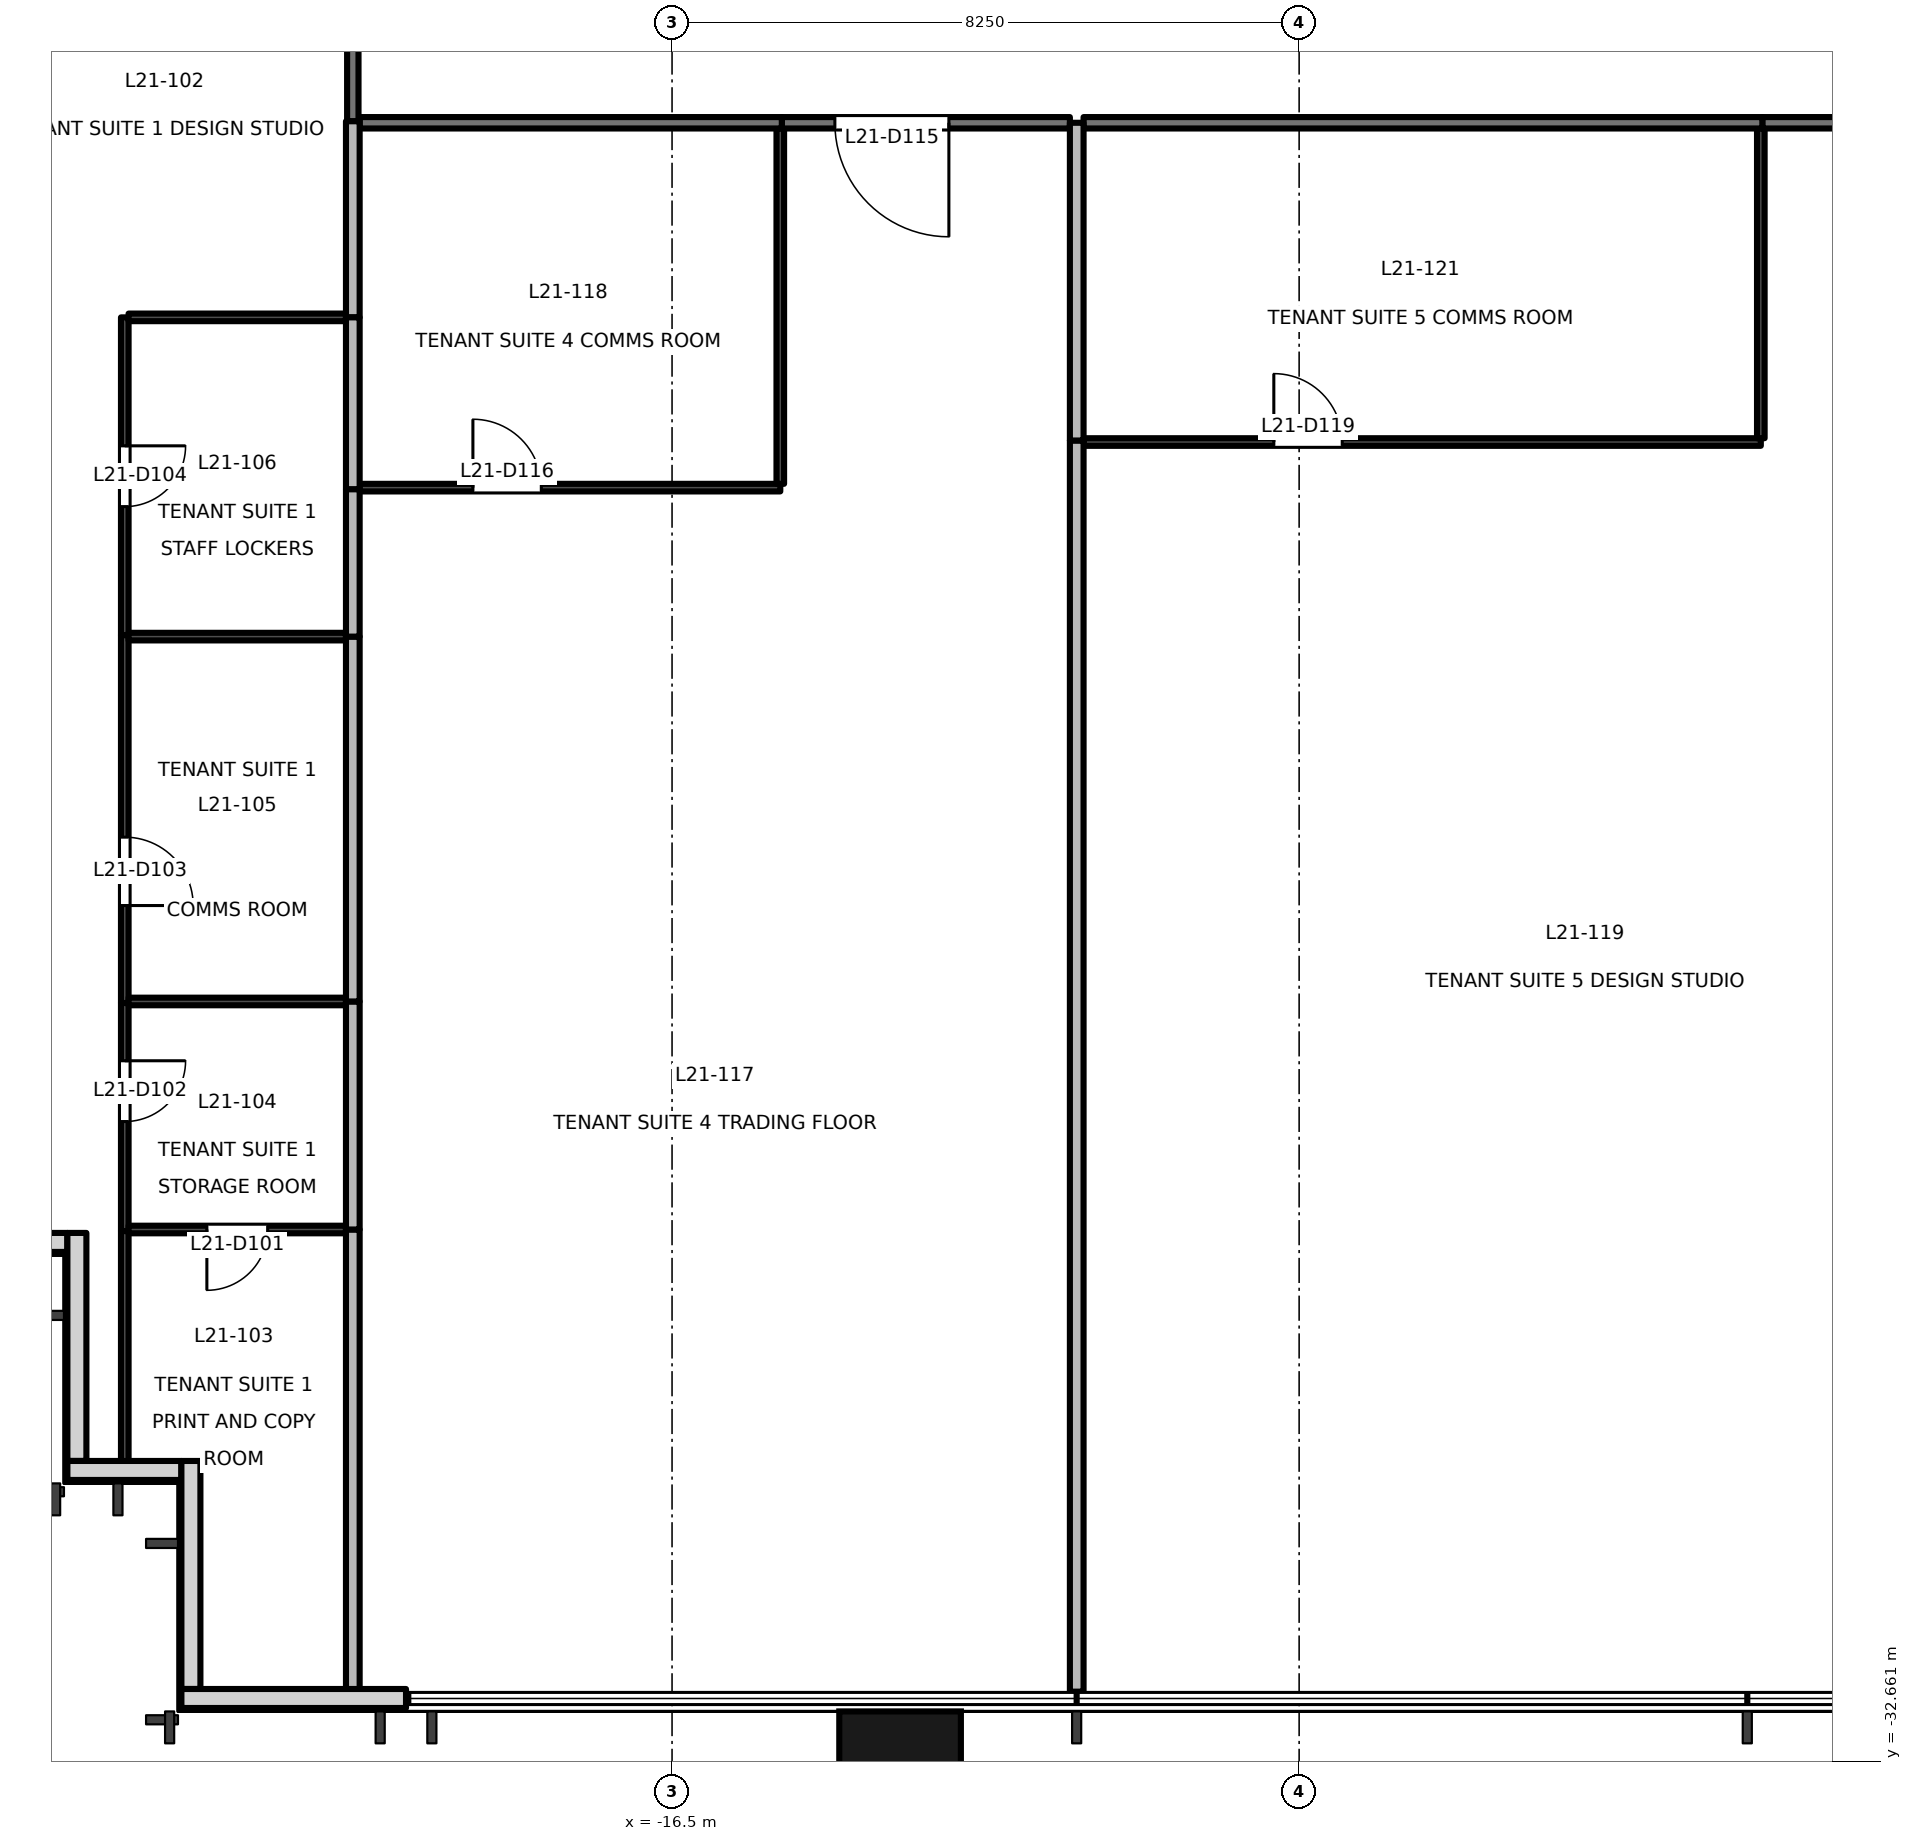
"""IFC4 building model, lengths in metres.
Left out: names, types, materials, properties, quantities, classifications, styles, units other than length and angle.
Written with IfcOpenShell. Run it as: python <this file> out.ifc"""

import sys

from ifc_helpers import new_model, si_unit, direction, frame, frame_2d, origin, origin_2d, place, context, subcontext, project, spatial, rectangle, extrude, element, fill, save


model = new_model("IFC4")
c1 = context("Model", 3, precision=1e-05, world=origin(), true_north=direction((0.0, 1.0)))
c2 = subcontext(c1, "Body", "Model", "MODEL_VIEW")
j1 = project(units=[si_unit("LENGTHUNIT", "METRE"), si_unit("PLANEANGLEUNIT", "RADIAN")], contexts=[c1])
p1 = place(None, origin())
s1 = spatial("IfcSite", under=j1, at=p1, CompositionType="ELEMENT")
p2 = place(p1, origin())
s2 = spatial("IfcBuilding", under=s1, at=p2, CompositionType="ELEMENT")
p3 = place(p2, frame((0.0, 0.0, 95.7)))
s3 = spatial("IfcBuildingStorey", under=s2, at=p3, CompositionType="ELEMENT", Elevation=95.7)
p4 = place(p3, frame((-13.5, -32.9, -0.2), z_axis=(0.0, 0.0, 1.0), x_axis=(1.0, 0.0, 0.0)))
e1 = element("IfcColumn", 1, at=p4, inside=s3, PredefinedType="COLUMN", context=c2, shape_type="SweptSolid", body=[
    extrude(rectangle(XDim=1.6, YDim=1.8, at=origin_2d()), origin(), (0.0, 0.0, 1.0), 4.0),
])
p5 = place(p3, frame((-25.91, -25.83, 0.0), z_axis=(0.0, 0.0, 1.0), x_axis=(1.0, 0.0, 0.0)))
e2 = element("IfcWall", 2, at=p5, inside=s3, PredefinedType="SOLIDWALL", context=c2, shape_type="SweptSolid", body=[
    extrude(rectangle(XDim=1.455, YDim=0.25, at=frame_2d((0.728, 0.0))), origin(), (0.0, 0.0, 1.0), 3.8),
])
p6 = place(p3, frame((-24.33, -25.705, 0.0), z_axis=(0.0, 0.0, 1.0), x_axis=(0.0, -1.0, 0.0)))
e3 = element("IfcWall", 3, at=p6, inside=s3, PredefinedType="SOLIDWALL", context=c2, shape_type="SweptSolid", body=[
    extrude(rectangle(XDim=3.0, YDim=0.25, at=frame_2d((1.5, 0.0))), origin(), (0.0, 0.0, 1.0), 3.8),
])
p7 = place(p3, frame((-24.455, -28.83, 0.0), z_axis=(0.0, 0.0, 1.0), x_axis=(1.0, 0.0, 0.0)))
e4 = element("IfcWall", 4, at=p7, inside=s3, PredefinedType="SOLIDWALL", context=c2, shape_type="SweptSolid", body=[
    extrude(rectangle(XDim=1.5, YDim=0.25, at=frame_2d((0.75, 0.0))), origin(), (0.0, 0.0, 1.0), 3.8),
])
p8 = place(p3, frame((-22.83, -28.705, 0.0), z_axis=(0.0, 0.0, 1.0), x_axis=(0.0, -1.0, 0.0)))
e5 = element("IfcWall", 5, at=p8, inside=s3, PredefinedType="SOLIDWALL", context=c2, shape_type="SweptSolid", body=[
    extrude(rectangle(XDim=3.0, YDim=0.25, at=frame_2d((1.5, 0.0))), origin(), (0.0, 0.0, 1.0), 3.8),
])
p9 = place(p3, frame((-22.955, -31.83, 0.0), z_axis=(0.0, 0.0, 1.0), x_axis=(1.0, 0.0, 0.0)))
e6 = element("IfcWall", 6, at=p9, inside=s3, PredefinedType="SOLIDWALL", context=c2, shape_type="SweptSolid", body=[
    extrude(rectangle(XDim=2.955, YDim=0.25, at=frame_2d((1.478, 0.0))), origin(), (0.0, 0.0, 1.0), 3.8),
])
p10 = place(p3, frame((-20.7, -11.08, 0.0), z_axis=(0.0, 0.0, 1.0), x_axis=(0.0, 1.0, 0.0)))
e7 = element("IfcWall", 7, at=p10, inside=s3, PredefinedType="PARTITIONING", context=c2, shape_type="SweptSolid", body=[
    extrude(rectangle(XDim=3.4, YDim=0.15, at=frame_2d((1.7, 0.0))), origin(), (0.0, 0.0, 1.0), 3.8),
])
p11 = place(p3, frame((-11.266, -11.1, 0.0), z_axis=(0.0, 0.0, 1.0), x_axis=(-1.0, 0.0, 0.0)))
e8 = element("IfcWall", 8, at=p11, inside=s3, PredefinedType="PARTITIONING", context=c2, shape_type="SweptSolid", body=[
    extrude(rectangle(XDim=3.79, YDim=0.15, at=frame_2d((1.895, 0.0))), origin(), (0.0, 0.0, 1.0), 2.8),
])
p12 = place(p11, frame((1.592, 0.0, 0.0)))
e9 = element("IfcOpeningElement", 9, at=p12, cuts=e8, PredefinedType="OPENING", context=c2, shape_type="SweptSolid", body=[
    extrude(rectangle(XDim=1.5, YDim=2.1, at=frame_2d((0.75, 1.05))), frame((0.0, 0.085, 0.0), z_axis=(0.0, -1.0, 0.0), x_axis=(1.0, 0.0, 0.0)), (0.0, 0.0, 1.0), 0.171),
])
p13 = place(p3, frame((-15.056, -11.1, 0.0), z_axis=(0.0, 0.0, 1.0), x_axis=(-1.0, 0.0, 0.0)))
e10 = element("IfcWall", 10, at=p13, inside=s3, PredefinedType="PARTITIONING", context=c2, shape_type="SweptSolid", body=[
    extrude(rectangle(XDim=5.554, YDim=0.15, at=frame_2d((2.777, 0.0))), origin(), (0.0, 0.0, 1.0), 3.8),
])
p14 = place(p3, frame((4.425, -11.1, 0.0), z_axis=(0.0, 0.0, 1.0), x_axis=(-1.0, 0.0, 0.0)))
e11 = element("IfcWall", 11, at=p14, inside=s3, PredefinedType="PARTITIONING", context=c2, shape_type="SweptSolid", body=[
    extrude(rectangle(XDim=6.581, YDim=0.15, at=frame_2d((3.291, 0.0))), origin(), (0.0, 0.0, 1.0), 2.8),
])
p15 = place(p3, frame((-2.156, -11.1, 0.0), z_axis=(0.0, 0.0, 1.0), x_axis=(-1.0, 0.0, 0.0)))
e12 = element("IfcWall", 12, at=p15, inside=s3, PredefinedType="PARTITIONING", context=c2, shape_type="SweptSolid", body=[
    extrude(rectangle(XDim=8.93, YDim=0.15, at=frame_2d((4.465, 0.0))), origin(), (0.0, 0.0, 1.0), 2.8),
])
p16 = place(p3, frame((-23.7, -25.68, 0.0), z_axis=(0.0, 0.0, 1.0), x_axis=(0.0, -1.0, 0.0)))
e13 = element("IfcWall", 13, at=p16, inside=s3, PredefinedType="PARTITIONING", context=c2, shape_type="SweptSolid", body=[
    extrude(rectangle(XDim=3.06, YDim=0.1, at=frame_2d((1.53, 0.0))), origin(), (0.0, 0.0, 1.0), 3.8),
])
p17 = place(p3, frame((-23.7, -22.68, 0.0), z_axis=(0.0, 0.0, 1.0), x_axis=(0.0, -1.0, 0.0)))
e14 = element("IfcWall", 14, at=p17, inside=s3, PredefinedType="PARTITIONING", context=c2, shape_type="SweptSolid", body=[
    extrude(rectangle(XDim=3.0, YDim=0.1, at=frame_2d((1.5, 0.0))), origin(), (0.0, 0.0, 1.0), 3.8),
])
p18 = place(p17, frame((0.76, 0.0, 0.0)))
e15 = element("IfcOpeningElement", 15, at=p18, cuts=e14, PredefinedType="OPENING", context=c2, shape_type="SweptSolid", body=[
    extrude(rectangle(XDim=0.8, YDim=2.1, at=frame_2d((0.4, 1.05))), frame((0.0, 0.061, 0.0), z_axis=(0.0, -1.0, 0.0), x_axis=(1.0, 0.0, 0.0)), (0.0, 0.0, 1.0), 0.121),
])
p19 = place(p3, frame((-23.7, -17.84, 0.0), z_axis=(0.0, 0.0, 1.0), x_axis=(0.0, -1.0, 0.0)))
e16 = element("IfcWall", 16, at=p19, inside=s3, PredefinedType="PARTITIONING", context=c2, shape_type="SweptSolid", body=[
    extrude(rectangle(XDim=4.84, YDim=0.1, at=frame_2d((2.42, 0.0))), origin(), (0.0, 0.0, 1.0), 3.8),
])
p20 = place(p19, frame((2.658, 0.0, 0.0)))
e17 = element("IfcOpeningElement", 17, at=p20, cuts=e16, PredefinedType="OPENING", context=c2, shape_type="SweptSolid", body=[
    extrude(rectangle(XDim=0.9, YDim=2.1, at=frame_2d((0.45, 1.05))), frame((0.0, 0.061, 0.0), z_axis=(0.0, -1.0, 0.0), x_axis=(1.0, 0.0, 0.0)), (0.0, 0.0, 1.0), 0.121),
])
p21 = place(p3, frame((-23.7, -13.66, 0.0), z_axis=(0.0, 0.0, 1.0), x_axis=(0.0, -1.0, 0.0)))
e18 = element("IfcWall", 18, at=p21, inside=s3, PredefinedType="PARTITIONING", context=c2, shape_type="SweptSolid", body=[
    extrude(rectangle(XDim=4.18, YDim=0.1, at=frame_2d((2.09, 0.0))), origin(), (0.0, 0.0, 1.0), 3.8),
])
p22 = place(p21, frame((1.69, 0.0, 0.0)))
e19 = element("IfcOpeningElement", 19, at=p22, cuts=e18, PredefinedType="OPENING", context=c2, shape_type="SweptSolid", body=[
    extrude(rectangle(XDim=0.8, YDim=2.1, at=frame_2d((0.4, 1.05))), frame((0.0, 0.061, 0.0), z_axis=(0.0, -1.0, 0.0), x_axis=(1.0, 0.0, 0.0)), (0.0, 0.0, 1.0), 0.121),
])
p23 = place(p3, frame((-20.79, -13.66, 0.0), z_axis=(0.0, 0.0, 1.0), x_axis=(-1.0, 0.0, 0.0)))
e20 = element("IfcWall", 20, at=p23, inside=s3, PredefinedType="PARTITIONING", context=c2, shape_type="SweptSolid", body=[
    extrude(rectangle(XDim=2.86, YDim=0.1, at=frame_2d((1.43, 0.0))), origin(), (0.0, 0.0, 1.0), 3.8),
])
p24 = place(p3, frame((-20.7, -11.08, 0.0), z_axis=(0.0, 0.0, 1.0), x_axis=(0.0, -1.0, 0.0)))
e21 = element("IfcWall", 21, at=p24, inside=s3, PredefinedType="PARTITIONING", context=c2, shape_type="SweptSolid", body=[
    extrude(rectangle(XDim=2.58, YDim=0.18, at=frame_2d((1.29, 0.0))), origin(), (0.0, 0.0, 1.0), 3.8),
])
p25 = place(p3, frame((-20.79, -25.66, 0.0), z_axis=(0.0, 0.0, 1.0), x_axis=(-1.0, 0.0, 0.0)))
e22 = element("IfcWall", 22, at=p25, inside=s3, PredefinedType="PARTITIONING", context=c2, shape_type="SweptSolid", body=[
    extrude(rectangle(XDim=2.86, YDim=0.1, at=frame_2d((1.43, 0.0))), origin(), (0.0, 0.0, 1.0), 3.8),
])
p26 = place(p25, frame((1.03, 0.0, 0.0)))
e23 = element("IfcOpeningElement", 23, at=p26, cuts=e22, PredefinedType="OPENING", context=c2, shape_type="SweptSolid", body=[
    extrude(rectangle(XDim=0.8, YDim=2.1, at=frame_2d((0.4, 1.05))), frame((0.0, 0.061, 0.0), z_axis=(0.0, -1.0, 0.0), x_axis=(1.0, 0.0, 0.0)), (0.0, 0.0, 1.0), 0.121),
])
p27 = place(p3, frame((-20.7, -25.66, 0.0), z_axis=(0.0, 0.0, 1.0), x_axis=(0.0, -1.0, 0.0)))
e24 = element("IfcWall", 24, at=p27, inside=s3, PredefinedType="PARTITIONING", context=c2, shape_type="SweptSolid", body=[
    extrude(rectangle(XDim=6.08, YDim=0.18, at=frame_2d((3.04, 0.0))), origin(), (0.0, 0.0, 1.0), 3.8),
])
p28 = place(p3, frame((-23.65, -22.66, 0.0), z_axis=(0.0, 0.0, 1.0), x_axis=(1.0, 0.0, 0.0)))
e25 = element("IfcWall", 25, at=p28, inside=s3, PredefinedType="PARTITIONING", context=c2, shape_type="SweptSolid", body=[
    extrude(rectangle(XDim=2.86, YDim=0.1, at=frame_2d((1.43, 0.0))), origin(), (0.0, 0.0, 1.0), 3.8),
])
p29 = place(p3, frame((-20.7, -22.66, 0.0), z_axis=(0.0, 0.0, 1.0), x_axis=(0.0, -1.0, 0.0)))
e26 = element("IfcWall", 26, at=p29, inside=s3, PredefinedType="PARTITIONING", context=c2, shape_type="SweptSolid", body=[
    extrude(rectangle(XDim=3.0, YDim=0.18, at=frame_2d((1.5, 0.0))), origin(), (0.0, 0.0, 1.0), 3.8),
])
p30 = place(p3, frame((-23.65, -17.86, 0.0), z_axis=(0.0, 0.0, 1.0), x_axis=(1.0, 0.0, 0.0)))
e27 = element("IfcWall", 27, at=p30, inside=s3, PredefinedType="PARTITIONING", context=c2, shape_type="SweptSolid", body=[
    extrude(rectangle(XDim=2.86, YDim=0.1, at=frame_2d((1.43, 0.0))), origin(), (0.0, 0.0, 1.0), 3.8),
])
p31 = place(p3, frame((-20.7, -17.86, 0.0), z_axis=(0.0, 0.0, 1.0), x_axis=(0.0, -1.0, 0.0)))
e28 = element("IfcWall", 28, at=p31, inside=s3, PredefinedType="PARTITIONING", context=c2, shape_type="SweptSolid", body=[
    extrude(rectangle(XDim=4.8, YDim=0.18, at=frame_2d((2.4, 0.0))), origin(), (0.0, 0.0, 1.0), 3.8),
])
p32 = place(p3, frame((-20.7, -15.92, 0.0), z_axis=(0.0, 0.0, 1.0), x_axis=(0.0, -1.0, 0.0)))
e29 = element("IfcWall", 29, at=p32, inside=s3, PredefinedType="PARTITIONING", context=c2, shape_type="SweptSolid", body=[
    extrude(rectangle(XDim=1.94, YDim=0.18, at=frame_2d((0.97, 0.0))), origin(), (0.0, 0.0, 1.0), 3.8),
])
p33 = place(p3, frame((-20.7, -13.66, 0.0), z_axis=(0.0, 0.0, 1.0), x_axis=(0.0, -1.0, 0.0)))
e30 = element("IfcWall", 30, at=p33, inside=s3, PredefinedType="PARTITIONING", context=c2, shape_type="SweptSolid", body=[
    extrude(rectangle(XDim=2.26, YDim=0.18, at=frame_2d((1.13, 0.0))), origin(), (0.0, 0.0, 1.0), 3.8),
])
p34 = place(p3, frame((-20.61, -15.9, 0.0), z_axis=(0.0, 0.0, 1.0), x_axis=(1.0, 0.0, 0.0)))
e31 = element("IfcWall", 31, at=p34, inside=s3, PredefinedType="PARTITIONING", context=c2, shape_type="SweptSolid", body=[
    extrude(rectangle(XDim=5.534, YDim=0.1, at=frame_2d((2.767, 0.0))), origin(), (0.0, 0.0, 1.0), 3.8),
])
p35 = place(p34, frame((1.49, 0.0, 0.0)))
e32 = element("IfcOpeningElement", 32, at=p35, cuts=e31, PredefinedType="OPENING", context=c2, shape_type="SweptSolid", body=[
    extrude(rectangle(XDim=0.9, YDim=2.1, at=frame_2d((0.45, 1.05))), frame((0.0, 0.061, 0.0), z_axis=(0.0, -1.0, 0.0), x_axis=(1.0, 0.0, 0.0)), (0.0, 0.0, 1.0), 0.121),
])
p36 = place(p3, frame((-15.076, -15.85, 0.0), z_axis=(0.0, 0.0, 1.0), x_axis=(0.0, 1.0, 0.0)))
e33 = element("IfcWall", 33, at=p36, inside=s3, PredefinedType="PARTITIONING", context=c2, shape_type="SweptSolid", body=[
    extrude(rectangle(XDim=4.675, YDim=0.1, at=frame_2d((2.337, 0.0))), origin(), (0.0, 0.0, 1.0), 3.8),
])
p37 = place(p3, frame((-11.176, -15.28, 0.0), z_axis=(0.0, 0.0, 1.0), x_axis=(0.0, -1.0, 0.0)))
e34 = element("IfcWall", 34, at=p37, inside=s3, PredefinedType="PARTITIONING", context=c2, shape_type="SweptSolid", body=[
    extrude(rectangle(XDim=16.46, YDim=0.18, at=frame_2d((8.23, 0.0))), origin(), (0.0, 0.0, 1.0), 3.8),
])
p38 = place(p3, frame((-11.176, -11.1, 0.0), z_axis=(0.0, 0.0, 1.0), x_axis=(0.0, -1.0, 0.0)))
e35 = element("IfcWall", 35, at=p38, inside=s3, PredefinedType="PARTITIONING", context=c2, shape_type="SweptSolid", body=[
    extrude(rectangle(XDim=4.18, YDim=0.18, at=frame_2d((2.09, 0.0))), origin(), (0.0, 0.0, 1.0), 3.8),
])
p39 = place(p3, frame((-11.086, -15.3, 0.0), z_axis=(0.0, 0.0, 1.0), x_axis=(1.0, 0.0, 0.0)))
e36 = element("IfcWall", 36, at=p39, inside=s3, PredefinedType="PARTITIONING", context=c2, shape_type="SweptSolid", body=[
    extrude(rectangle(XDim=8.91, YDim=0.1, at=frame_2d((4.455, 0.0))), origin(), (0.0, 0.0, 1.0), 2.8),
])
p40 = place(p39, frame((2.503, 0.0, 0.0)))
e37 = element("IfcOpeningElement", 37, at=p40, cuts=e36, PredefinedType="OPENING", context=c2, shape_type="SweptSolid", body=[
    extrude(rectangle(XDim=0.9, YDim=2.1, at=frame_2d((0.45, 1.05))), frame((0.0, 0.061, 0.0), z_axis=(0.0, -1.0, 0.0), x_axis=(1.0, 0.0, 0.0)), (0.0, 0.0, 1.0), 0.121),
])
p41 = place(p3, frame((-2.176, -15.25, 0.0), z_axis=(0.0, 0.0, 1.0), x_axis=(0.0, 1.0, 0.0)))
e38 = element("IfcWall", 38, at=p41, inside=s3, PredefinedType="PARTITIONING", context=c2, shape_type="SweptSolid", body=[
    extrude(rectangle(XDim=4.075, YDim=0.1, at=frame_2d((2.038, 0.0))), origin(), (0.0, 0.0, 1.0), 3.8),
])
p42 = place(p26, origin())
e39 = element("IfcDoor", 39, at=p42, inside=s3, OperationType="SINGLE_SWING_RIGHT", PredefinedType="DOOR", context=c2, shape_type="SweptSolid", body=[
    extrude(rectangle(XDim=0.8, YDim=2.1, at=frame_2d((0.4, 1.05))), frame((0.0, 0.025, 0.0), z_axis=(0.0, -1.0, 0.0), x_axis=(1.0, 0.0, 0.0)), (0.0, 0.0, 1.0), 0.05),
])
fill(e23, e39)
p43 = place(p18, origin())
e40 = element("IfcDoor", 40, at=p43, inside=s3, OperationType="SINGLE_SWING_LEFT", PredefinedType="DOOR", context=c2, shape_type="SweptSolid", body=[
    extrude(rectangle(XDim=0.8, YDim=2.1, at=frame_2d((0.4, 1.05))), frame((0.0, 0.025, 0.0), z_axis=(0.0, -1.0, 0.0), x_axis=(1.0, 0.0, 0.0)), (0.0, 0.0, 1.0), 0.05),
])
fill(e15, e40)
p44 = place(p20, origin())
e41 = element("IfcDoor", 41, at=p44, inside=s3, OperationType="SINGLE_SWING_RIGHT", PredefinedType="DOOR", context=c2, shape_type="SweptSolid", body=[
    extrude(rectangle(XDim=0.9, YDim=2.1, at=frame_2d((0.45, 1.05))), frame((0.0, 0.025, 0.0), z_axis=(0.0, -1.0, 0.0), x_axis=(1.0, 0.0, 0.0)), (0.0, 0.0, 1.0), 0.05),
])
fill(e17, e41)
p45 = place(p22, origin())
e42 = element("IfcDoor", 42, at=p45, inside=s3, OperationType="SINGLE_SWING_LEFT", PredefinedType="DOOR", context=c2, shape_type="SweptSolid", body=[
    extrude(rectangle(XDim=0.8, YDim=2.1, at=frame_2d((0.4, 1.05))), frame((0.0, 0.025, 0.0), z_axis=(0.0, -1.0, 0.0), x_axis=(1.0, 0.0, 0.0)), (0.0, 0.0, 1.0), 0.05),
])
fill(e19, e42)
p46 = place(p12, origin())
e43 = element("IfcDoor", 43, at=p46, inside=s3, OperationType="DOUBLE_DOOR_SINGLE_SWING", PredefinedType="DOOR", context=c2, shape_type="SweptSolid", body=[
    extrude(rectangle(XDim=1.5, YDim=2.1, at=frame_2d((0.75, 1.05))), frame((0.0, 0.025, 0.0), z_axis=(0.0, -1.0, 0.0), x_axis=(1.0, 0.0, 0.0)), (0.0, 0.0, 1.0), 0.05),
])
fill(e9, e43)
p47 = place(p35, origin())
e44 = element("IfcDoor", 44, at=p47, inside=s3, OperationType="SINGLE_SWING_LEFT", PredefinedType="DOOR", context=c2, shape_type="SweptSolid", body=[
    extrude(rectangle(XDim=0.9, YDim=2.1, at=frame_2d((0.45, 1.05))), frame((0.0, 0.025, 0.0), z_axis=(0.0, -1.0, 0.0), x_axis=(1.0, 0.0, 0.0)), (0.0, 0.0, 1.0), 0.05),
])
fill(e32, e44)
p48 = place(p40, origin())
e45 = element("IfcDoor", 45, at=p48, inside=s3, OperationType="SINGLE_SWING_LEFT", PredefinedType="DOOR", context=c2, shape_type="SweptSolid", body=[
    extrude(rectangle(XDim=0.9, YDim=2.1, at=frame_2d((0.45, 1.05))), frame((0.0, 0.025, 0.0), z_axis=(0.0, -1.0, 0.0), x_axis=(1.0, 0.0, 0.0)), (0.0, 0.0, 1.0), 0.05),
])
fill(e37, e45)
save(model, sys.argv[1])
